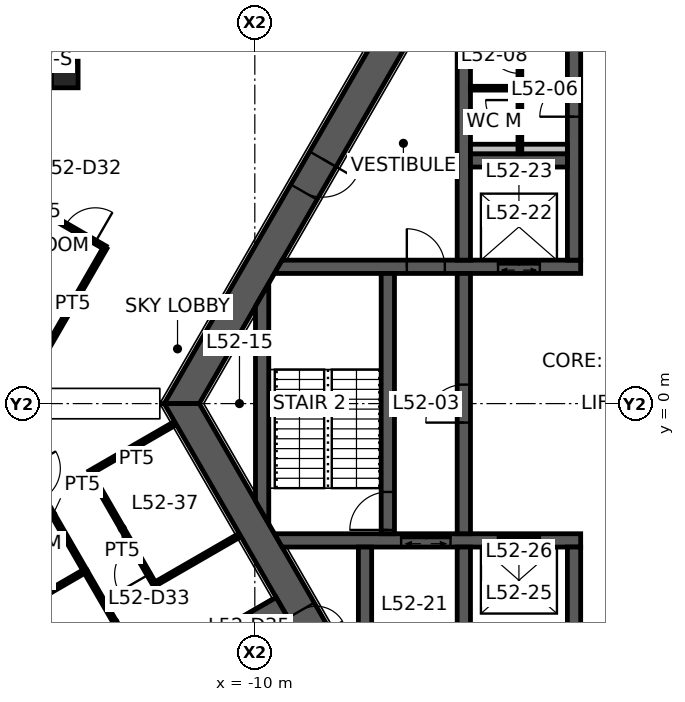
"""IFC4 building model, lengths in metres.
Left out: names, types, materials, properties, quantities, classifications, styles, units other than length and angle.
Written with IfcOpenShell. Run it as: python <this file> out.ifc"""

import sys

from ifc_helpers import new_model, si_unit, direction, frame, frame_2d, origin, origin_2d, place, context, subcontext, project, spatial, polyline, rectangle, hollow_rectangle, outline, extrude, element, fill, save


model = new_model("IFC4")
c1 = context("Model", 3, precision=1e-05, world=origin(), true_north=direction((0.0, 1.0)))
c2 = subcontext(c1, "Body", "Model", "MODEL_VIEW")
j1 = project(units=[si_unit("LENGTHUNIT", "METRE"), si_unit("PLANEANGLEUNIT", "RADIAN")], contexts=[c1])
p1 = place(None, origin())
s1 = spatial("IfcSite", under=j1, at=p1, CompositionType="ELEMENT")
p2 = place(p1, origin())
s2 = spatial("IfcBuilding", under=s1, at=p2, CompositionType="ELEMENT")
p3 = place(p2, frame((0.0, 0.0, 208.3)))
s3 = spatial("IfcBuildingStorey", under=s2, at=p3, CompositionType="ELEMENT", Elevation=208.3)
p4 = place(p3, frame((-15.0, 8.66, 0.0), z_axis=(0.0, 0.0, 1.0), x_axis=(1.0, 0.0, 0.0)))
e1 = element("IfcColumn", 1, at=p4, inside=s3, PredefinedType="COLUMN", context=c2, shape_type="SweptSolid", body=[
    extrude(hollow_rectangle(XDim=0.7, YDim=0.7, WallThickness=0.036, at=origin_2d()), origin(), (0.0, 0.0, 1.0), 4.5),
])
p5 = place(p3, frame((-5.961, 10.325, 0.0), z_axis=(0.0, 0.0, 1.0), x_axis=(-0.500004296715, -0.866022923061, 0.0)))
e2 = element("IfcWall", 2, at=p5, inside=s3, PredefinedType="SHEAR", context=c2, shape_type="SweptSolid", body=[
    extrude(outline(polyline([(-0.231, -0.4), (4.494, -0.4), (5.494, -0.4), (12.153, -0.4), (11.691, 0.4), (5.494, 0.4), (4.494, 0.4), (0.231, 0.4), (-0.231, -0.4)])), origin(), (0.0, 0.0, 1.0), 4.5),
])
p6 = place(p5, frame((4.494, 0.0, 0.0)))
e3 = element("IfcOpeningElement", 3, at=p6, cuts=e2, PredefinedType="OPENING", context=c2, shape_type="SweptSolid", body=[
    extrude(rectangle(XDim=1.0, YDim=2.1, at=frame_2d((0.5, 1.05))), frame((0.0, 0.41, 0.0), z_axis=(0.0, -1.0, 0.0), x_axis=(1.0, 0.0, 0.0)), (0.0, 0.0, 1.0), 0.82),
])
p7 = place(p3, frame((-11.922, 0.0, 0.0), z_axis=(0.0, 0.0, 1.0), x_axis=(0.500004296715, -0.866022923061, 0.0)))
e4 = element("IfcWall", 4, at=p7, inside=s3, PredefinedType="SHEAR", context=c2, shape_type="SweptSolid", body=[
    extrude(outline(polyline([(-0.231, -0.4), (6.281, -0.4), (7.081, -0.4), (12.153, -0.4), (11.691, 0.4), (7.081, 0.4), (6.281, 0.4), (0.231, 0.4), (-0.231, -0.4)])), origin(), (0.0, 0.0, 1.0), 4.5),
])
p8 = place(p7, frame((6.281, 0.0, 0.0)))
e5 = element("IfcOpeningElement", 5, at=p8, cuts=e4, PredefinedType="OPENING", context=c2, shape_type="SweptSolid", body=[
    extrude(rectangle(XDim=0.8, YDim=2.1, at=frame_2d((0.4, 1.05))), frame((0.0, 0.41, 0.0), z_axis=(0.0, -1.0, 0.0), x_axis=(1.0, 0.0, 0.0)), (0.0, 0.0, 1.0), 0.82),
])
p9 = place(p3, frame((-9.288, -5.363, 0.0), z_axis=(0.0, 0.0, 1.0), x_axis=(-0.866027473358, -0.499996415376, 0.0)))
e6 = element("IfcWall", 6, at=p9, inside=s3, PredefinedType="SHEAR", context=c2, shape_type="SweptSolid", body=[
    extrude(rectangle(XDim=7.045, YDim=0.6, at=frame_2d((3.523, 0.0))), origin(), (0.0, 0.0, 1.0), 4.5),
])
p10 = place(p9, frame((1.0, 0.0, 0.0)))
e7 = element("IfcOpeningElement", 7, at=p10, cuts=e6, PredefinedType="OPENING", context=c2, shape_type="SweptSolid", body=[
    extrude(rectangle(XDim=1.0, YDim=2.1, at=frame_2d((0.5, 1.05))), frame((0.0, 0.31, 0.0), z_axis=(0.0, -1.0, 0.0), x_axis=(1.0, 0.0, 0.0)), (0.0, 0.0, 1.0), 0.62),
])
p11 = place(p3, frame((-9.382, 3.6, 0.0), z_axis=(0.0, 0.0, 1.0), x_axis=(1.0, 0.0, 0.0)))
e8 = element("IfcWall", 8, at=p11, inside=s3, PredefinedType="SHEAR", context=c2, shape_type="SweptSolid", body=[
    extrude(outline(polyline([(-0.101, -0.175), (3.382, -0.175), (4.382, -0.175), (5.782, -0.175), (6.882, -0.175), (7.957, -0.175), (7.957, 0.175), (6.882, 0.175), (5.782, 0.175), (4.382, 0.175), (3.382, 0.175), (0.101, 0.175), (-0.101, -0.175)])), origin(), (0.0, 0.0, 1.0), 4.5),
])
p12 = place(p11, frame((3.382, 0.0, 0.0)))
e9 = element("IfcOpeningElement", 9, at=p12, cuts=e8, PredefinedType="OPENING", context=c2, shape_type="SweptSolid", body=[
    extrude(rectangle(XDim=1.0, YDim=2.1, at=frame_2d((0.5, 1.05))), frame((0.0, 0.185, 0.0), z_axis=(0.0, -1.0, 0.0), x_axis=(1.0, 0.0, 0.0)), (0.0, 0.0, 1.0), 0.37),
])
p13 = place(p11, frame((5.782, 0.0, 0.0)))
e10 = element("IfcOpeningElement", 10, at=p13, cuts=e8, PredefinedType="OPENING", context=c2, shape_type="SweptSolid", body=[
    extrude(rectangle(XDim=1.1, YDim=2.1, at=frame_2d((0.55, 1.05))), frame((0.0, 0.185, 0.0), z_axis=(0.0, -1.0, 0.0), x_axis=(1.0, 0.0, 0.0)), (0.0, 0.0, 1.0), 0.37),
])
p14 = place(p3, frame((-9.382, -3.6, 0.0), z_axis=(0.0, 0.0, 1.0), x_axis=(1.0, 0.0, 0.0)))
e11 = element("IfcWall", 11, at=p14, inside=s3, PredefinedType="SHEAR", context=c2, shape_type="SweptSolid", body=[
    extrude(outline(polyline([(0.101, -0.175), (3.232, -0.175), (4.532, -0.175), (5.782, -0.175), (6.882, -0.175), (7.957, -0.175), (7.957, 0.175), (6.882, 0.175), (5.782, 0.175), (4.532, 0.175), (3.232, 0.175), (-0.101, 0.175), (0.101, -0.175)])), origin(), (0.0, 0.0, 1.0), 4.5),
])
p15 = place(p14, frame((5.782, 0.0, 0.0)))
e12 = element("IfcOpeningElement", 12, at=p15, cuts=e11, PredefinedType="OPENING", context=c2, shape_type="SweptSolid", body=[
    extrude(rectangle(XDim=1.1, YDim=2.1, at=frame_2d((0.55, 1.05))), frame((0.0, 0.185, 0.0), z_axis=(0.0, -1.0, 0.0), x_axis=(1.0, 0.0, 0.0)), (0.0, 0.0, 1.0), 0.37),
])
p16 = place(p14, frame((3.232, 0.0, 0.0)))
e13 = element("IfcOpeningElement", 13, at=p16, cuts=e11, PredefinedType="OPENING", context=c2, shape_type="SweptSolid", body=[
    extrude(rectangle(XDim=1.3, YDim=2.1, at=frame_2d((0.65, 1.05))), frame((0.0, 0.185, 0.0), z_axis=(0.0, -1.0, 0.0), x_axis=(1.0, 0.0, 0.0)), (0.0, 0.0, 1.0), 0.37),
])
p17 = place(p3, frame((-1.6, 3.775, 0.0), z_axis=(0.0, 0.0, 1.0), x_axis=(0.0, 1.0, 0.0)))
e14 = element("IfcWall", 14, at=p17, inside=s3, PredefinedType="SHEAR", context=c2, shape_type="SweptSolid", body=[
    extrude(rectangle(XDim=6.15, YDim=0.35, at=frame_2d((3.075, 0.0))), origin(), (0.0, 0.0, 1.0), 4.5),
])
p18 = place(p17, frame((3.775, 0.0, 0.0)))
e15 = element("IfcOpeningElement", 15, at=p18, cuts=e14, PredefinedType="OPENING", context=c2, shape_type="SweptSolid", body=[
    extrude(rectangle(XDim=0.9, YDim=2.1, at=frame_2d((0.45, 1.05))), frame((0.0, 0.185, 0.0), z_axis=(0.0, -1.0, 0.0), x_axis=(1.0, 0.0, 0.0)), (0.0, 0.0, 1.0), 0.37),
])
p19 = place(p3, frame((-1.6, -3.775, 0.0), z_axis=(0.0, 0.0, 1.0), x_axis=(0.0, -1.0, 0.0)))
e16 = element("IfcWall", 16, at=p19, inside=s3, PredefinedType="SHEAR", context=c2, shape_type="SweptSolid", body=[
    extrude(rectangle(XDim=6.15, YDim=0.35, at=frame_2d((3.075, 0.0))), origin(), (0.0, 0.0, 1.0), 4.5),
])
p20 = place(p19, frame((3.775, 0.0, 0.0)))
e17 = element("IfcOpeningElement", 17, at=p20, cuts=e16, PredefinedType="OPENING", context=c2, shape_type="SweptSolid", body=[
    extrude(rectangle(XDim=0.9, YDim=2.1, at=frame_2d((0.45, 1.05))), frame((0.0, 0.185, 0.0), z_axis=(0.0, -1.0, 0.0), x_axis=(1.0, 0.0, 0.0)), (0.0, 0.0, 1.0), 0.37),
])
p21 = place(p3, frame((-4.5, -3.425, 0.0), z_axis=(0.0, 0.0, 1.0), x_axis=(0.0, 1.0, 0.0)))
e18 = element("IfcWall", 18, at=p21, inside=s3, PredefinedType="SHEAR", context=c2, shape_type="SweptSolid", body=[
    extrude(rectangle(XDim=6.85, YDim=0.35, at=frame_2d((3.425, 0.0))), origin(), (0.0, 0.0, 1.0), 4.5),
])
p22 = place(p21, frame((2.925, 0.0, 0.0)))
e19 = element("IfcOpeningElement", 19, at=p22, cuts=e18, PredefinedType="OPENING", context=c2, shape_type="SweptSolid", body=[
    extrude(rectangle(XDim=1.0, YDim=2.1, at=frame_2d((0.5, 1.05))), frame((0.0, 0.185, 0.0), z_axis=(0.0, -1.0, 0.0), x_axis=(1.0, 0.0, 0.0)), (0.0, 0.0, 1.0), 0.37),
])
p23 = place(p3, frame((-6.5, -3.425, 0.0), z_axis=(0.0, 0.0, 1.0), x_axis=(0.0, 1.0, 0.0)))
e20 = element("IfcWall", 20, at=p23, inside=s3, PredefinedType="SHEAR", context=c2, shape_type="SweptSolid", body=[
    extrude(rectangle(XDim=6.85, YDim=0.35, at=frame_2d((3.425, 0.0))), origin(), (0.0, 0.0, 1.0), 4.5),
])
p24 = place(p23, frame((0.1, 0.0, 0.0)))
e21 = element("IfcOpeningElement", 21, at=p24, cuts=e20, PredefinedType="OPENING", context=c2, shape_type="SweptSolid", body=[
    extrude(rectangle(XDim=1.0, YDim=2.1, at=frame_2d((0.5, 1.05))), frame((0.0, 0.185, 0.0), z_axis=(0.0, -1.0, 0.0), x_axis=(1.0, 0.0, 0.0)), (0.0, 0.0, 1.0), 0.37),
])
for number, where, z_axis, x_axis in (
    (22, (-4.5, 3.775, 0.0), (0.0, 0.0, 1.0), (0.0, 1.0, 0.0)),
    (23, (-4.5, -3.775, 0.0), (0.0, 0.0, 1.0), (0.0, -1.0, 0.0)),
):
    element("IfcWall", number, at=place(p3, frame(where, z_axis=z_axis, x_axis=x_axis)), inside=s3, PredefinedType="SHEAR", context=c2, shape_type="SweptSolid", body=[
        extrude(rectangle(XDim=6.15, YDim=0.35, at=frame_2d((3.075, 0.0))), origin(), (0.0, 0.0, 1.0), 4.5),
    ])
p25 = place(p3, frame((-4.325, 6.4, 0.0), z_axis=(0.0, 0.0, 1.0), x_axis=(1.0, 0.0, 0.0)))
e24 = element("IfcWall", 24, at=p25, inside=s3, PredefinedType="SHEAR", context=c2, shape_type="SweptSolid", body=[
    extrude(rectangle(XDim=2.55, YDim=0.35, at=frame_2d((1.275, 0.0))), origin(), (0.0, 0.0, 1.0), 4.5),
])
p26 = place(p3, frame((-7.1, -3.775, 0.0), z_axis=(0.0, 0.0, 1.0), x_axis=(0.0, -1.0, 0.0)))
e25 = element("IfcWall", 25, at=p26, inside=s3, PredefinedType="SHEAR", context=c2, shape_type="SweptSolid", body=[
    extrude(rectangle(XDim=3.05, YDim=0.35, at=frame_2d((1.525, 0.0))), origin(), (0.0, 0.0, 1.0), 4.5),
])
p27 = place(p3, frame((-9.808, -2.862, 0.0), z_axis=(0.0, 0.0, 1.0), x_axis=(0.0, 1.0, 0.0)))
e26 = element("IfcWall", 26, at=p27, inside=s3, PredefinedType="SHEAR", context=c2, shape_type="SweptSolid", body=[
    extrude(outline(polyline([(-0.303, -0.175), (6.028, -0.175), (5.421, 0.175), (0.303, 0.175), (-0.303, -0.175)])), origin(), (0.0, 0.0, 1.0), 4.5),
])
p28 = place(p3, frame((-4.325, 6.7, 0.0), z_axis=(0.0, 0.0, 1.0), x_axis=(1.0, 0.0, 0.0)))
e27 = element("IfcWall", 27, at=p28, inside=s3, PredefinedType="PLUMBINGWALL", context=c2, shape_type="SweptSolid", body=[
    extrude(rectangle(XDim=2.55, YDim=0.25, at=frame_2d((1.275, 0.0))), origin(), (0.0, 0.0, 1.0), 4.5),
])
p29 = place(p3, frame((-3.025, 6.575, 0.0), z_axis=(0.0, 0.0, 1.0), x_axis=(0.0, 1.0, 0.0)))
e28 = element("IfcWall", 28, at=p29, inside=s3, PredefinedType="PARTITIONING", context=c2, shape_type="SweptSolid", body=[
    extrude(rectangle(XDim=3.35, YDim=0.1, at=frame_2d((1.675, 0.0))), origin(), (0.0, 0.0, 1.0), 3.55),
])
p30 = place(p29, frame((0.512, 0.0, 0.0)))
e29 = element("IfcOpeningElement", 29, at=p30, cuts=e28, PredefinedType="OPENING", context=c2, shape_type="SweptSolid", body=[
    extrude(rectangle(XDim=0.9, YDim=2.1, at=frame_2d((0.45, 1.05))), frame((0.0, 0.06, 0.0), z_axis=(0.0, -1.0, 0.0), x_axis=(1.0, 0.0, 0.0)), (0.0, 0.0, 1.0), 0.12),
])
p31 = place(p29, frame((2.113, 0.0, 0.0)))
e30 = element("IfcOpeningElement", 30, at=p31, cuts=e28, PredefinedType="OPENING", context=c2, shape_type="SweptSolid", body=[
    extrude(rectangle(XDim=0.9, YDim=2.1, at=frame_2d((0.45, 1.05))), frame((0.0, 0.06, 0.0), z_axis=(0.0, -1.0, 0.0), x_axis=(1.0, 0.0, 0.0)), (0.0, 0.0, 1.0), 0.12),
])
p32 = place(p3, frame((-3.075, 8.3, 0.0), z_axis=(0.0, 0.0, 1.0), x_axis=(-1.0, 0.0, 0.0)))
e31 = element("IfcWall", 31, at=p32, inside=s3, PredefinedType="PARTITIONING", context=c2, shape_type="SweptSolid", body=[
    extrude(rectangle(XDim=1.25, YDim=0.1, at=frame_2d((0.625, 0.0))), origin(), (0.0, 0.0, 1.0), 3.55),
])
p33 = place(p3, frame((-17.219, 5.997, 0.0), z_axis=(0.0, 0.0, 1.0), x_axis=(0.86602253128, -0.50000497529, 0.0)))
e32 = element("IfcWall", 32, at=p33, inside=s3, PredefinedType="PARTITIONING", context=c2, shape_type="SweptSolid", body=[
    extrude(rectangle(XDim=3.79, YDim=0.1, at=frame_2d((1.895, 0.0))), origin(), (0.0, 0.0, 1.0), 3.55),
])
p34 = place(p33, frame((2.59, 0.0, 0.0)))
e33 = element("IfcOpeningElement", 33, at=p34, cuts=e32, PredefinedType="OPENING", context=c2, shape_type="SweptSolid", body=[
    extrude(rectangle(XDim=0.9, YDim=2.1, at=frame_2d((0.45, 1.05))), frame((0.0, 0.06, 0.0), z_axis=(0.0, -1.0, 0.0), x_axis=(1.0, 0.0, 0.0)), (0.0, 0.0, 1.0), 0.12),
])
p35 = place(p3, frame((-13.937, 4.102, 0.0), z_axis=(0.0, 0.0, 1.0), x_axis=(-0.500021524473, -0.866012976267, 0.0)))
e34 = element("IfcWall", 34, at=p35, inside=s3, PredefinedType="PARTITIONING", context=c2, shape_type="SweptSolid", body=[
    extrude(rectangle(XDim=3.415, YDim=0.1, at=frame_2d((1.708, 0.0))), origin(), (0.0, 0.0, 1.0), 3.55),
])
p36 = place(p3, frame((-14.34, -1.813, 0.0), z_axis=(0.0, 0.0, 1.0), x_axis=(0.866021702275, 0.500006411147, 0.0)))
e35 = element("IfcWall", 35, at=p36, inside=s3, PredefinedType="PARTITIONING", context=c2, shape_type="SweptSolid", body=[
    extrude(rectangle(XDim=2.58, YDim=0.1, at=frame_2d((1.29, 0.0))), origin(), (0.0, 0.0, 1.0), 3.55),
])
p37 = place(p3, frame((-12.64, -4.757, 0.0), z_axis=(0.0, 0.0, 1.0), x_axis=(-0.500008388397, 0.866020560687, 0.0)))
e36 = element("IfcWall", 36, at=p37, inside=s3, PredefinedType="PARTITIONING", context=c2, shape_type="SweptSolid", body=[
    extrude(rectangle(XDim=3.4, YDim=0.1, at=frame_2d((1.7, 0.0))), origin(), (0.0, 0.0, 1.0), 3.55),
])
p38 = place(p37, frame((0.3, 0.0, 0.0)))
e37 = element("IfcOpeningElement", 37, at=p38, cuts=e36, PredefinedType="OPENING", context=c2, shape_type="SweptSolid", body=[
    extrude(rectangle(XDim=0.9, YDim=2.1, at=frame_2d((0.45, 1.05))), frame((0.0, 0.06, 0.0), z_axis=(0.0, -1.0, 0.0), x_axis=(1.0, 0.0, 0.0)), (0.0, 0.0, 1.0), 0.12),
])
p39 = place(p3, frame((-10.406, -3.467, 0.0), z_axis=(0.0, 0.0, 1.0), x_axis=(-0.866062676131, -0.499935436844, 0.0)))
e38 = element("IfcWall", 38, at=p39, inside=s3, PredefinedType="PARTITIONING", context=c2, shape_type="SweptSolid", body=[
    extrude(rectangle(XDim=2.58, YDim=0.1, at=frame_2d((1.29, 0.0))), origin(), (0.0, 0.0, 1.0), 3.55),
])
p40 = place(p3, frame((-14.458, -4.398, 0.0), z_axis=(0.0, 0.0, 1.0), x_axis=(-0.865192832628, -0.501439290811, 0.0)))
e39 = element("IfcWall", 39, at=p40, inside=s3, PredefinedType="PARTITIONING", context=c2, shape_type="SweptSolid", body=[
    extrude(rectangle(XDim=3.08, YDim=0.1, at=frame_2d((1.54, 0.0))), origin(), (0.0, 0.0, 1.0), 3.55),
])
p41 = place(p3, frame((-16.167, -1.447, 0.0), z_axis=(0.0, 0.0, 1.0), x_axis=(0.499990572262, -0.866030846823, 0.0)))
e40 = element("IfcWall", 40, at=p41, inside=s3, PredefinedType="PARTITIONING", context=c2, shape_type="SweptSolid", body=[
    extrude(rectangle(XDim=3.416, YDim=0.1, at=frame_2d((1.708, 0.0))), origin(), (0.0, 0.0, 1.0), 3.55),
])
p42 = place(p41, frame((0.3, 0.0, 0.0)))
e41 = element("IfcOpeningElement", 41, at=p42, cuts=e40, PredefinedType="OPENING", context=c2, shape_type="SweptSolid", body=[
    extrude(rectangle(XDim=0.9, YDim=2.1, at=frame_2d((0.45, 1.05))), frame((0.0, 0.06, 0.0), z_axis=(0.0, -1.0, 0.0), x_axis=(1.0, 0.0, 0.0)), (0.0, 0.0, 1.0), 0.12),
])
p43 = place(p3, frame((-14.46, -4.405, 0.0), z_axis=(0.0, 0.0, 1.0), x_axis=(0.501235238742, -0.865311062823, 0.0)))
e42 = element("IfcWall", 42, at=p43, inside=s3, PredefinedType="PARTITIONING", context=c2, shape_type="SweptSolid", body=[
    extrude(rectangle(XDim=3.095, YDim=0.1, at=frame_2d((1.548, 0.0))), origin(), (0.0, 0.0, 1.0), 3.55),
])
p44 = place(p43, frame((1.896, 0.0, 0.0)))
e43 = element("IfcOpeningElement", 43, at=p44, cuts=e42, PredefinedType="OPENING", context=c2, shape_type="SweptSolid", body=[
    extrude(rectangle(XDim=0.9, YDim=2.1, at=frame_2d((0.45, 1.05))), frame((0.0, 0.06, 0.0), z_axis=(0.0, -1.0, 0.0), x_axis=(1.0, 0.0, 0.0)), (0.0, 0.0, 1.0), 0.12),
])
p45 = place(p8, origin())
e44 = element("IfcDoor", 44, at=p45, inside=s3, OperationType="SINGLE_SWING_RIGHT", PredefinedType="DOOR", context=c2, shape_type="SweptSolid", body=[
    extrude(rectangle(XDim=0.8, YDim=2.1, at=frame_2d((0.4, 1.05))), frame((0.0, 0.025, 0.0), z_axis=(0.0, -1.0, 0.0), x_axis=(1.0, 0.0, 0.0)), (0.0, 0.0, 1.0), 0.05),
])
fill(e5, e44)
p46 = place(p6, origin())
e45 = element("IfcDoor", 45, at=p46, inside=s3, OperationType="SINGLE_SWING_LEFT", PredefinedType="DOOR", context=c2, shape_type="SweptSolid", body=[
    extrude(rectangle(XDim=1.0, YDim=2.1, at=frame_2d((0.5, 1.05))), frame((0.0, 0.025, 0.0), z_axis=(0.0, -1.0, 0.0), x_axis=(1.0, 0.0, 0.0)), (0.0, 0.0, 1.0), 0.05),
])
fill(e3, e45)
p47 = place(p22, origin())
e46 = element("IfcDoor", 46, at=p47, inside=s3, OperationType="SINGLE_SWING_LEFT", PredefinedType="DOOR", context=c2, shape_type="SweptSolid", body=[
    extrude(rectangle(XDim=1.0, YDim=2.1, at=frame_2d((0.5, 1.05))), frame((0.0, 0.025, 0.0), z_axis=(0.0, -1.0, 0.0), x_axis=(1.0, 0.0, 0.0)), (0.0, 0.0, 1.0), 0.05),
])
fill(e19, e46)
p48 = place(p24, origin())
e47 = element("IfcDoor", 47, at=p48, inside=s3, OperationType="SINGLE_SWING_LEFT", PredefinedType="DOOR", context=c2, shape_type="SweptSolid", body=[
    extrude(rectangle(XDim=1.0, YDim=2.1, at=frame_2d((0.5, 1.05))), frame((0.0, 0.025, 0.0), z_axis=(0.0, -1.0, 0.0), x_axis=(1.0, 0.0, 0.0)), (0.0, 0.0, 1.0), 0.05),
])
fill(e21, e47)
p49 = place(p12, origin())
e48 = element("IfcDoor", 48, at=p49, inside=s3, OperationType="SINGLE_SWING_LEFT", PredefinedType="DOOR", context=c2, shape_type="SweptSolid", body=[
    extrude(rectangle(XDim=1.0, YDim=2.1, at=frame_2d((0.5, 1.05))), frame((0.0, 0.025, 0.0), z_axis=(0.0, -1.0, 0.0), x_axis=(1.0, 0.0, 0.0)), (0.0, 0.0, 1.0), 0.05),
])
fill(e9, e48)
p50 = place(p18, origin())
e49 = element("IfcDoor", 49, at=p50, inside=s3, OperationType="SINGLE_SWING_LEFT", PredefinedType="DOOR", context=c2, shape_type="SweptSolid", body=[
    extrude(rectangle(XDim=0.9, YDim=2.1, at=frame_2d((0.45, 1.05))), frame((0.0, 0.025, 0.0), z_axis=(0.0, -1.0, 0.0), x_axis=(1.0, 0.0, 0.0)), (0.0, 0.0, 1.0), 0.05),
])
fill(e15, e49)
p51 = place(p30, origin())
e50 = element("IfcDoor", 50, at=p51, inside=s3, OperationType="SINGLE_SWING_RIGHT", PredefinedType="DOOR", context=c2, shape_type="SweptSolid", body=[
    extrude(rectangle(XDim=0.9, YDim=2.1, at=frame_2d((0.45, 1.05))), frame((0.0, 0.025, 0.0), z_axis=(0.0, -1.0, 0.0), x_axis=(1.0, 0.0, 0.0)), (0.0, 0.0, 1.0), 0.05),
])
fill(e29, e50)
p52 = place(p31, origin())
e51 = element("IfcDoor", 51, at=p52, inside=s3, OperationType="SINGLE_SWING_RIGHT", PredefinedType="DOOR", context=c2, shape_type="SweptSolid", body=[
    extrude(rectangle(XDim=0.9, YDim=2.1, at=frame_2d((0.45, 1.05))), frame((0.0, 0.025, 0.0), z_axis=(0.0, -1.0, 0.0), x_axis=(1.0, 0.0, 0.0)), (0.0, 0.0, 1.0), 0.05),
])
fill(e30, e51)
p53 = place(p34, origin())
e52 = element("IfcDoor", 52, at=p53, inside=s3, OperationType="SINGLE_SWING_RIGHT", PredefinedType="DOOR", context=c2, shape_type="SweptSolid", body=[
    extrude(rectangle(XDim=0.9, YDim=2.1, at=frame_2d((0.45, 1.05))), frame((0.0, 0.025, 0.0), z_axis=(0.0, -1.0, 0.0), x_axis=(1.0, 0.0, 0.0)), (0.0, 0.0, 1.0), 0.05),
])
fill(e33, e52)
p54 = place(p38, origin())
e53 = element("IfcDoor", 53, at=p54, inside=s3, OperationType="SINGLE_SWING_LEFT", PredefinedType="DOOR", context=c2, shape_type="SweptSolid", body=[
    extrude(rectangle(XDim=0.9, YDim=2.1, at=frame_2d((0.45, 1.05))), frame((0.0, 0.025, 0.0), z_axis=(0.0, -1.0, 0.0), x_axis=(1.0, 0.0, 0.0)), (0.0, 0.0, 1.0), 0.05),
])
fill(e37, e53)
p55 = place(p13, origin())
e54 = element("IfcDoor", 54, at=p55, inside=s3, OperationType="DOUBLE_DOOR_SLIDING", PredefinedType="DOOR", context=c2, shape_type="SweptSolid", body=[
    extrude(rectangle(XDim=1.1, YDim=2.1, at=frame_2d((0.55, 1.05))), frame((0.0, 0.025, 0.0), z_axis=(0.0, -1.0, 0.0), x_axis=(1.0, 0.0, 0.0)), (0.0, 0.0, 1.0), 0.05),
])
fill(e10, e54)
p56 = place(p15, origin())
e55 = element("IfcDoor", 55, at=p56, inside=s3, OperationType="DOUBLE_DOOR_SLIDING", PredefinedType="DOOR", context=c2, shape_type="SweptSolid", body=[
    extrude(rectangle(XDim=1.1, YDim=2.1, at=frame_2d((0.55, 1.05))), frame((0.0, 0.025, 0.0), z_axis=(0.0, -1.0, 0.0), x_axis=(1.0, 0.0, 0.0)), (0.0, 0.0, 1.0), 0.05),
])
fill(e12, e55)
p57 = place(p16, origin())
e56 = element("IfcDoor", 56, at=p57, inside=s3, OperationType="DOUBLE_DOOR_SLIDING", PredefinedType="DOOR", context=c2, shape_type="SweptSolid", body=[
    extrude(rectangle(XDim=1.3, YDim=2.1, at=frame_2d((0.65, 1.05))), frame((0.0, 0.025, 0.0), z_axis=(0.0, -1.0, 0.0), x_axis=(1.0, 0.0, 0.0)), (0.0, 0.0, 1.0), 0.05),
])
fill(e13, e56)
save(model, sys.argv[1])
